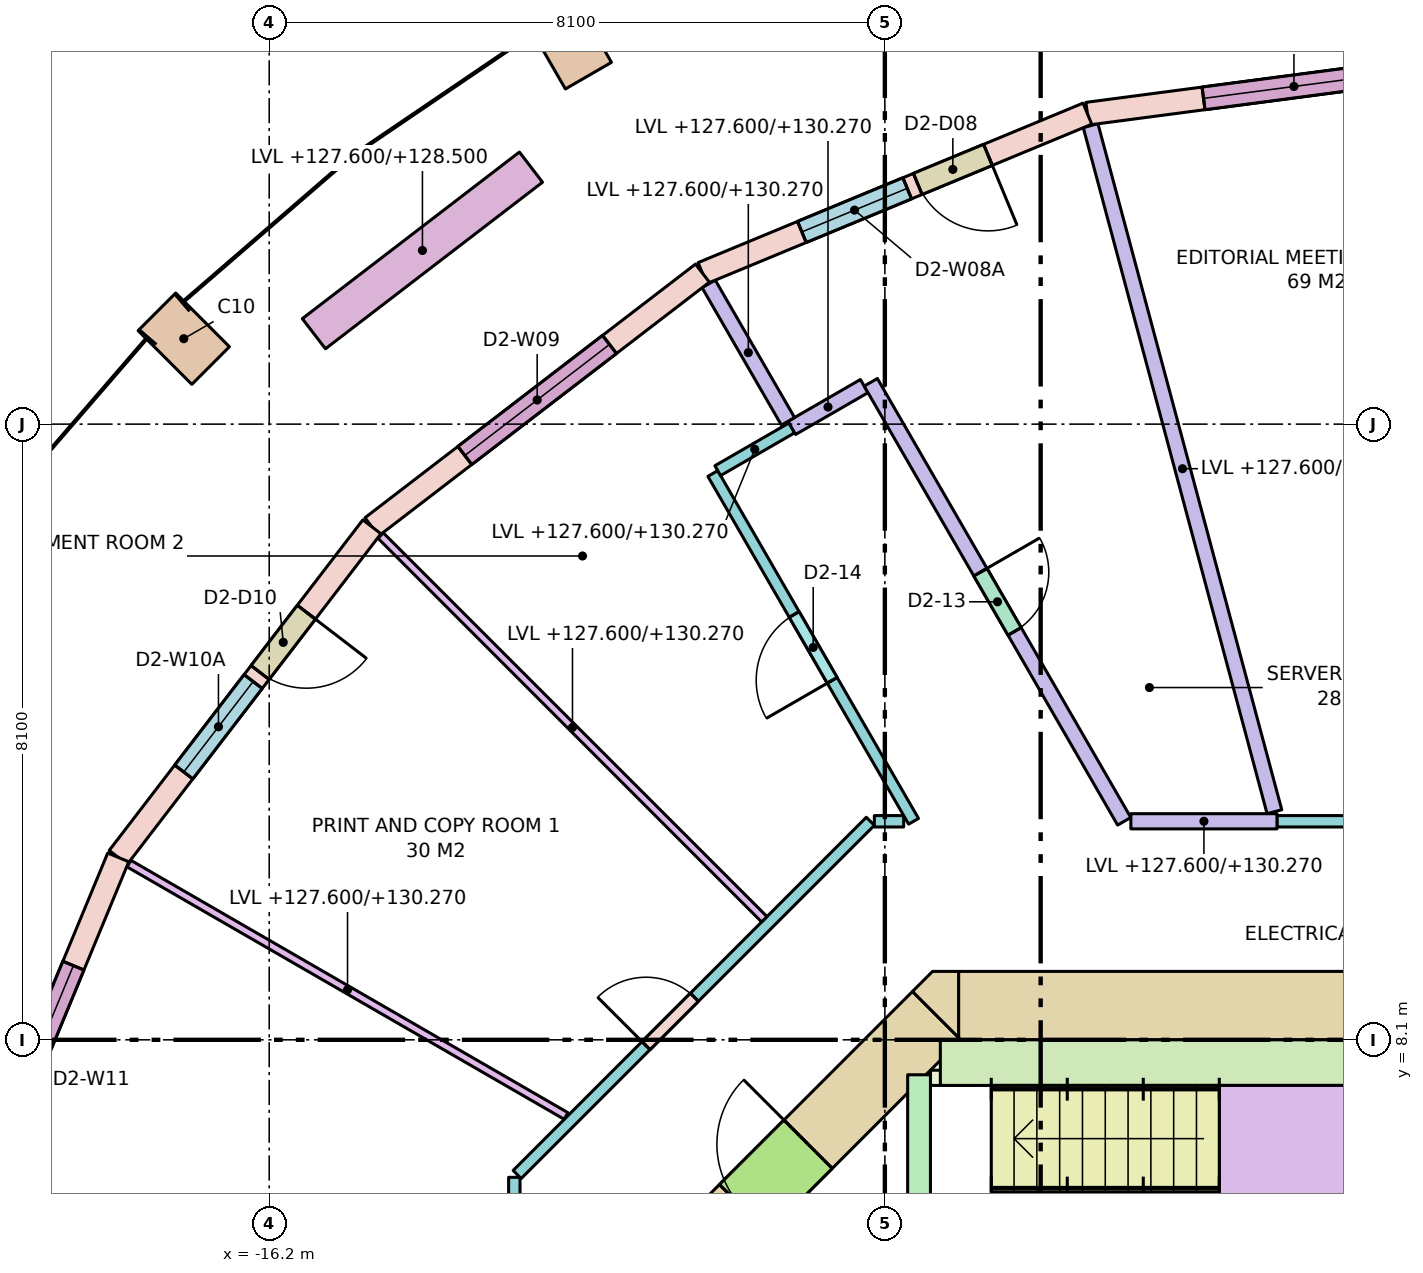
"""IFC4 building model, lengths in metres.
Left out: names, types, materials, properties, quantities, classifications, styles, units other than length and angle.
Written with IfcOpenShell. Run it as: python <this file> out.ifc"""

import sys

from ifc_helpers import new_model, si_unit, direction, frame, frame_2d, origin, origin_2d, place, context, subcontext, project, spatial, polyline, rectangle, outline, extrude, element, fill, save


model = new_model("IFC4")
c1 = context("Model", 3, precision=1e-05, world=origin(), true_north=direction((0.0, 1.0)))
c2 = subcontext(c1, "Body", "Model", "MODEL_VIEW")
j1 = project(units=[si_unit("LENGTHUNIT", "METRE"), si_unit("PLANEANGLEUNIT", "RADIAN")], contexts=[c1])
p1 = place(None, origin())
s1 = spatial("IfcSite", under=j1, at=p1, CompositionType="ELEMENT")
p2 = place(p1, origin())
s2 = spatial("IfcBuilding", under=s1, at=p2, CompositionType="ELEMENT")
p3 = place(p2, frame((0.0, 0.0, 127.6)))
s3 = spatial("IfcBuildingStorey", under=s2, at=p3, CompositionType="ELEMENT", Elevation=127.6)
for number, where, z_axis, x_axis in (
    (1, (-12.25, 21.218, 0.0), (0.0, 0.0, 1.0), (-0.866, -0.5, 0.0)),
    (2, (-17.324, 17.324, 0.0), (0.0, 0.0, 1.0), (-0.707, -0.707, 0.0)),
):
    element("IfcColumn", number, at=place(p3, frame(where, z_axis=z_axis, x_axis=x_axis)), inside=s3, PredefinedType="COLUMN", context=c2, shape_type="SweptSolid", body=[
        extrude(rectangle(XDim=0.7, YDim=1.0, at=origin_2d()), origin(), (0.0, 0.0, 1.0), 3.8),
    ])
p4 = place(p3, frame((-7.13, 8.55, -0.28), z_axis=(0.0, 0.0, 1.0), x_axis=(1.0, 0.0, 0.0)))
e3 = element("IfcWall", 3, at=p4, inside=s3, PredefinedType="SHEAR", context=c2, shape_type="SweptSolid", body=[
    extrude(rectangle(XDim=14.26, YDim=0.9, at=frame_2d((7.13, 0.0))), origin(), (0.0, 0.0, 1.0), 3.8),
])
p5 = place(p4, frame((5.48, 0.0, 0.28)))
e4 = element("IfcOpeningElement", 4, at=p5, cuts=e3, PredefinedType="OPENING", context=c2, shape_type="SweptSolid", body=[
    extrude(rectangle(XDim=0.7, YDim=2.1, at=frame_2d((0.35, 1.05))), frame((0.0, 0.46, 0.0), z_axis=(0.0, -1.0, 0.0), x_axis=(1.0, 0.0, 0.0)), (0.0, 0.0, 1.0), 0.92),
])
p6 = place(p4, frame((7.155, 0.0, 0.28)))
e5 = element("IfcOpeningElement", 5, at=p6, cuts=e3, PredefinedType="OPENING", context=c2, shape_type="SweptSolid", body=[
    extrude(rectangle(XDim=0.9, YDim=2.1, at=frame_2d((0.45, 1.05))), frame((0.0, 0.46, 0.0), z_axis=(0.0, -1.0, 0.0), x_axis=(1.0, 0.0, 0.0)), (0.0, 0.0, 1.0), 0.92),
])
p7 = place(p3, frame((-10.418, 5.418, -0.28), z_axis=(0.0, 0.0, 1.0), x_axis=(0.707106781187, 0.707106781187, 0.0)))
e6 = element("IfcWall", 6, at=p7, inside=s3, PredefinedType="SHEAR", context=c2, shape_type="SweptSolid", body=[
    extrude(rectangle(XDim=4.243, YDim=0.9, at=frame_2d((2.121, 0.0))), origin(), (0.0, 0.0, 1.0), 3.8),
])
p8 = place(p7, frame((0.65, 0.0, 0.28)))
e7 = element("IfcOpeningElement", 7, at=p8, cuts=e6, PredefinedType="OPENING", context=c2, shape_type="SweptSolid", body=[
    extrude(rectangle(XDim=1.2, YDim=2.1, at=frame_2d((0.6, 1.05))), frame((0.0, 0.46, 0.0), z_axis=(0.0, -1.0, 0.0), x_axis=(1.0, 0.0, 0.0)), (0.0, 0.0, 1.0), 0.92),
])
p9 = place(p3, frame((0.0, 0.0, -0.28)))
e8 = element("IfcWall", 8, at=p9, inside=s3, PredefinedType="SHEAR", context=c2, shape_type="SweptSolid", body=[
    extrude(outline(polyline([(-7.473, 9.0), (-7.13, 9.0), (-7.13, 8.13), (-7.736, 8.736), (-7.473, 9.0)])), origin(), (0.0, 0.0, 1.0), 3.8),
])
p10 = place(p3, frame((-7.65, 4.5, 0.0), z_axis=(0.0, 0.0, 1.0), x_axis=(0.0, 1.0, 0.0)))
e9 = element("IfcWall", 9, at=p10, inside=s3, PredefinedType="SHEAR", context=c2, shape_type="SweptSolid", body=[
    extrude(rectangle(XDim=3.14, YDim=0.3, at=frame_2d((1.57, 0.0))), origin(), (0.0, 0.0, 1.0), 3.52),
])
p11 = place(p10, frame((0.14, 0.0, 0.0)))
e10 = element("IfcOpeningElement", 10, at=p11, cuts=e9, PredefinedType="OPENING", context=c2, shape_type="SweptSolid", body=[
    extrude(rectangle(XDim=1.32, YDim=2.1, at=frame_2d((0.66, 1.05))), frame((0.0, 0.16, 0.0), z_axis=(0.0, -1.0, 0.0), x_axis=(1.0, 0.0, 0.0)), (0.0, 0.0, 1.0), 0.32),
])
p12 = place(p3, frame((-7.37, 7.8, 0.0), z_axis=(0.0, 0.0, 1.0), x_axis=(1.0, 0.0, 0.0)))
e11 = element("IfcWall", 11, at=p12, inside=s3, PredefinedType="SHEAR", context=c2, shape_type="SweptSolid", body=[
    extrude(rectangle(XDim=5.37, YDim=0.6, at=frame_2d((2.685, 0.0))), origin(), (0.0, 0.0, 1.0), 3.52),
])
p13 = place(p3, frame((-7.5, 7.6, 0.0), z_axis=(0.0, 0.0, 1.0), x_axis=(1.0, 0.0, 0.0)))
e12 = element("IfcWall", 12, at=p13, inside=s3, PredefinedType="SHEAR", context=c2, shape_type="SweptSolid", body=[
    extrude(rectangle(XDim=0.6, YDim=0.2, at=frame_2d((0.3, 0.0))), origin(), (0.0, 0.0, 1.0), 3.52),
])
p14 = place(p3, frame((0.0, 21.0, 0.0), z_axis=(0.0, 0.0, 1.0), x_axis=(-0.991444743541, -0.130527087244, 0.0)))
e13 = element("IfcWall", 13, at=p14, inside=s3, PredefinedType="STANDARD", context=c2, shape_type="SweptSolid", body=[
    extrude(rectangle(XDim=5.482, YDim=0.3, at=frame_2d((2.741, 0.0))), origin(), (0.0, 0.0, 1.0), 3.52),
])
p15 = place(p14, frame((1.541, 0.0, 0.8)))
e14 = element("IfcOpeningElement", 14, at=p15, cuts=e13, PredefinedType="OPENING", context=c2, shape_type="SweptSolid", body=[
    extrude(rectangle(XDim=2.4, YDim=2.5, at=frame_2d((1.2, 1.25))), frame((0.0, 0.16, 0.0), z_axis=(0.0, -1.0, 0.0), x_axis=(1.0, 0.0, 0.0)), (0.0, 0.0, 1.0), 0.32),
])
p16 = place(p3, frame((-5.435, 20.284, 0.0), z_axis=(0.0, 0.0, 1.0), x_axis=(-0.923877333662, -0.382688740813, 0.0)))
e15 = element("IfcWall", 15, at=p16, inside=s3, PredefinedType="STANDARD", context=c2, shape_type="SweptSolid", body=[
    extrude(rectangle(XDim=5.482, YDim=0.3, at=frame_2d((2.741, 0.0))), origin(), (0.0, 0.0, 1.0), 3.52),
])
p17 = place(p16, frame((1.416, 0.0, 0.0)))
e16 = element("IfcOpeningElement", 16, at=p17, cuts=e15, PredefinedType="OPENING", context=c2, shape_type="SweptSolid", body=[
    extrude(rectangle(XDim=1.0, YDim=2.4, at=frame_2d((0.5, 1.2))), frame((0.0, 0.16, 0.0), z_axis=(0.0, -1.0, 0.0), x_axis=(1.0, 0.0, 0.0)), (0.0, 0.0, 1.0), 0.32),
])
p18 = place(p16, frame((2.566, 0.0, 0.8)))
e17 = element("IfcOpeningElement", 17, at=p18, cuts=e15, PredefinedType="OPENING", context=c2, shape_type="SweptSolid", body=[
    extrude(rectangle(XDim=1.5, YDim=2.5, at=frame_2d((0.75, 1.25))), frame((0.0, 0.16, 0.0), z_axis=(0.0, -1.0, 0.0), x_axis=(1.0, 0.0, 0.0)), (0.0, 0.0, 1.0), 0.32),
])
p19 = place(p3, frame((-10.5, 18.187, 0.0), z_axis=(0.0, 0.0, 1.0), x_axis=(-0.793335336593, -0.608784891166, 0.0)))
e18 = element("IfcWall", 18, at=p19, inside=s3, PredefinedType="STANDARD", context=c2, shape_type="SweptSolid", body=[
    extrude(rectangle(XDim=5.482, YDim=0.3, at=frame_2d((2.741, 0.0))), origin(), (0.0, 0.0, 1.0), 3.52),
])
p20 = place(p19, frame((1.541, 0.0, 0.8)))
e19 = element("IfcOpeningElement", 19, at=p20, cuts=e18, PredefinedType="OPENING", context=c2, shape_type="SweptSolid", body=[
    extrude(rectangle(XDim=2.4, YDim=2.5, at=frame_2d((1.2, 1.25))), frame((0.0, 0.16, 0.0), z_axis=(0.0, -1.0, 0.0), x_axis=(1.0, 0.0, 0.0)), (0.0, 0.0, 1.0), 0.32),
])
p21 = place(p3, frame((-14.849, 14.849, 0.0), z_axis=(0.0, 0.0, 1.0), x_axis=(-0.608784891166, -0.793335336593, 0.0)))
e20 = element("IfcWall", 20, at=p21, inside=s3, PredefinedType="STANDARD", context=c2, shape_type="SweptSolid", body=[
    extrude(rectangle(XDim=5.482, YDim=0.3, at=frame_2d((2.741, 0.0))), origin(), (0.0, 0.0, 1.0), 3.52),
])
p22 = place(p21, frame((1.416, 0.0, 0.0)))
e21 = element("IfcOpeningElement", 21, at=p22, cuts=e20, PredefinedType="OPENING", context=c2, shape_type="SweptSolid", body=[
    extrude(rectangle(XDim=1.0, YDim=2.4, at=frame_2d((0.5, 1.2))), frame((0.0, 0.16, 0.0), z_axis=(0.0, -1.0, 0.0), x_axis=(1.0, 0.0, 0.0)), (0.0, 0.0, 1.0), 0.32),
])
p23 = place(p21, frame((2.566, 0.0, 0.8)))
e22 = element("IfcOpeningElement", 22, at=p23, cuts=e20, PredefinedType="OPENING", context=c2, shape_type="SweptSolid", body=[
    extrude(rectangle(XDim=1.5, YDim=2.5, at=frame_2d((0.75, 1.25))), frame((0.0, 0.16, 0.0), z_axis=(0.0, -1.0, 0.0), x_axis=(1.0, 0.0, 0.0)), (0.0, 0.0, 1.0), 0.32),
])
p24 = place(p3, frame((-18.187, 10.5, 0.0), z_axis=(0.0, 0.0, 1.0), x_axis=(-0.382688740813, -0.923877333662, 0.0)))
e23 = element("IfcWall", 23, at=p24, inside=s3, PredefinedType="STANDARD", context=c2, shape_type="SweptSolid", body=[
    extrude(rectangle(XDim=5.482, YDim=0.3, at=frame_2d((2.741, 0.0))), origin(), (0.0, 0.0, 1.0), 3.52),
])
p25 = place(p24, frame((1.541, 0.0, 0.8)))
e24 = element("IfcOpeningElement", 24, at=p25, cuts=e23, PredefinedType="OPENING", context=c2, shape_type="SweptSolid", body=[
    extrude(rectangle(XDim=2.4, YDim=2.5, at=frame_2d((1.2, 1.25))), frame((0.0, 0.16, 0.0), z_axis=(0.0, -1.0, 0.0), x_axis=(1.0, 0.0, 0.0)), (0.0, 0.0, 1.0), 0.32),
])
p26 = place(p3, frame((-12.756, 19.581, 0.0), z_axis=(0.0, 0.0, 1.0), x_axis=(-0.793384730612, -0.608720518162, 0.0)))
e25 = element("IfcWall", 25, at=p26, inside=s3, PredefinedType="PARAPET", context=c2, shape_type="SweptSolid", body=[
    extrude(rectangle(XDim=3.6, YDim=0.5, at=frame_2d((1.8, 0.0))), origin(), (0.0, 0.0, 1.0), 0.9),
])
p27 = place(p3, frame((-12.975, -6.291, 0.0), z_axis=(0.0, 0.0, 1.0), x_axis=(0.0, 1.0, 0.0)))
e26 = element("IfcWall", 26, at=p27, inside=s3, PredefinedType="PARTITIONING", context=c2, shape_type="SweptSolid", body=[
    extrude(rectangle(XDim=12.582, YDim=0.15, at=frame_2d((6.291, 0.0))), origin(), (0.0, 0.0, 1.0), 2.67),
])
p28 = place(p27, frame((5.391, 0.0, 0.0)))
e27 = element("IfcOpeningElement", 27, at=p28, cuts=e26, PredefinedType="OPENING", context=c2, shape_type="SweptSolid", body=[
    extrude(rectangle(XDim=1.8, YDim=2.1, at=frame_2d((0.9, 1.05))), frame((0.0, 0.085, 0.0), z_axis=(0.0, -1.0, 0.0), x_axis=(1.0, 0.0, 0.0)), (0.0, 0.0, 1.0), 0.17),
])
p29 = place(p3, frame((-12.938, 6.328, 0.0), z_axis=(0.0, 0.0, 1.0), x_axis=(0.707088206597, 0.707125355289, 0.0)))
e28 = element("IfcWall", 28, at=p29, inside=s3, PredefinedType="PARTITIONING", context=c2, shape_type="SweptSolid", body=[
    extrude(rectangle(XDim=6.572, YDim=0.15, at=frame_2d((3.286, 0.0))), origin(), (0.0, 0.0, 1.0), 2.67),
])
p30 = place(p29, frame((2.398, 0.0, 0.0)))
e29 = element("IfcOpeningElement", 29, at=p30, cuts=e28, PredefinedType="OPENING", context=c2, shape_type="SweptSolid", body=[
    extrude(rectangle(XDim=0.9, YDim=2.1, at=frame_2d((0.45, 1.05))), frame((0.0, 0.085, 0.0), z_axis=(0.0, -1.0, 0.0), x_axis=(1.0, 0.0, 0.0)), (0.0, 0.0, 1.0), 0.17),
])
p31 = place(p3, frame((-8.238, 10.975, 0.0), z_axis=(0.0, 0.0, 1.0), x_axis=(1.0, 0.0, 0.0)))
e30 = element("IfcWall", 30, at=p31, inside=s3, PredefinedType="PARTITIONING", context=c2, shape_type="SweptSolid", body=[
    extrude(rectangle(XDim=0.386, YDim=0.15, at=frame_2d((0.193, 0.0))), origin(), (0.0, 0.0, 1.0), 3.52),
])
p32 = place(p3, frame((-7.722, 10.975, 0.0), z_axis=(0.0, 0.0, 1.0), x_axis=(-0.499981143329, 0.866036290415, 0.0)))
e31 = element("IfcWall", 31, at=p32, inside=s3, PredefinedType="PARTITIONING", context=c2, shape_type="SweptSolid", body=[
    extrude(rectangle(XDim=5.283, YDim=0.15, at=frame_2d((2.642, 0.0))), origin(), (0.0, 0.0, 1.0), 3.52),
])
p33 = place(p32, frame((2.142, 0.0, 0.0)))
e32 = element("IfcOpeningElement", 32, at=p33, cuts=e31, PredefinedType="OPENING", context=c2, shape_type="SweptSolid", body=[
    extrude(rectangle(XDim=1.0, YDim=2.1, at=frame_2d((0.5, 1.05))), frame((0.0, 0.085, 0.0), z_axis=(0.0, -1.0, 0.0), x_axis=(1.0, 0.0, 0.0)), (0.0, 0.0, 1.0), 0.17),
])
p34 = place(p3, frame((-10.299, 15.588, 0.0), z_axis=(0.0, 0.0, 1.0), x_axis=(0.86599040064, 0.500060622324, 0.0)))
e33 = element("IfcWall", 33, at=p34, inside=s3, PredefinedType="PARTITIONING", context=c2, shape_type="SweptSolid", body=[
    extrude(rectangle(XDim=1.125, YDim=0.15, at=frame_2d((0.562, 0.0))), origin(), (0.0, 0.0, 1.0), 2.67),
])
p35 = place(p3, frame((-9.324, 16.15, 0.0), z_axis=(0.0, 0.0, 1.0), x_axis=(0.866159722779, 0.499767280476, 0.0)))
e34 = element("IfcWall", 34, at=p35, inside=s3, PredefinedType="PARTITIONING", context=c2, shape_type="SweptSolid", body=[
    extrude(rectangle(XDim=1.1, YDim=0.2, at=frame_2d((0.55, 0.0))), origin(), (0.0, 0.0, 1.0), 2.67),
])
p36 = place(p3, frame((-8.285, 16.75, 0.0), z_axis=(0.0, 0.0, 1.0), x_axis=(0.500021399824, -0.866013048238, 0.0)))
e35 = element("IfcWall", 35, at=p36, inside=s3, PredefinedType="PARTITIONING", context=c2, shape_type="SweptSolid", body=[
    extrude(rectangle(XDim=6.669, YDim=0.2, at=frame_2d((3.334, 0.0))), origin(), (0.0, 0.0, 1.0), 3.52),
])
p37 = place(p36, frame((2.884, 0.0, 0.0)))
e36 = element("IfcOpeningElement", 36, at=p37, cuts=e35, PredefinedType="OPENING", context=c2, shape_type="SweptSolid", body=[
    extrude(rectangle(XDim=0.9, YDim=2.1, at=frame_2d((0.45, 1.05))), frame((0.0, 0.11, 0.0), z_axis=(0.0, -1.0, 0.0), x_axis=(1.0, 0.0, 0.0)), (0.0, 0.0, 1.0), 0.22),
])
p38 = place(p3, frame((-4.863, 10.975, 0.0), z_axis=(0.0, 0.0, 1.0), x_axis=(1.0, 0.0, 0.0)))
e37 = element("IfcWall", 37, at=p38, inside=s3, PredefinedType="PARTITIONING", context=c2, shape_type="SweptSolid", body=[
    extrude(rectangle(XDim=1.923, YDim=0.2, at=frame_2d((0.961, 0.0))), origin(), (0.0, 0.0, 1.0), 2.67),
])
p39 = place(p3, frame((-2.941, 10.975, 0.0), z_axis=(0.0, 0.0, 1.0), x_axis=(1.0, 0.0, 0.0)))
e38 = element("IfcWall", 38, at=p39, inside=s3, PredefinedType="PARTITIONING", context=c2, shape_type="SweptSolid", body=[
    extrude(rectangle(XDim=4.567, YDim=0.15, at=frame_2d((2.283, 0.0))), origin(), (0.0, 0.0, 1.0), 2.67),
])
p40 = place(p3, frame((-2.974, 11.101, 0.0), z_axis=(0.0, 0.0, 1.0), x_axis=(-0.258810523233, 0.965928109677, 0.0)))
e39 = element("IfcWall", 39, at=p40, inside=s3, PredefinedType="PARTITIONING", context=c2, shape_type="SweptSolid", body=[
    extrude(rectangle(XDim=9.344, YDim=0.2, at=frame_2d((4.672, 0.0))), origin(), (0.0, 0.0, 1.0), 2.67),
])
p41 = place(p3, frame((-9.375, 16.237, 0.0), z_axis=(0.0, 0.0, 1.0), x_axis=(-0.499961989906, 0.86604734781, 0.0)))
e40 = element("IfcWall", 40, at=p41, inside=s3, PredefinedType="PARTITIONING", context=c2, shape_type="SweptSolid", body=[
    extrude(rectangle(XDim=2.088, YDim=0.2, at=frame_2d((1.044, 0.0))), origin(), (0.0, 0.0, 1.0), 2.67),
])
p42 = place(p3, frame((-9.686, 9.686, 0.0), z_axis=(0.0, 0.0, 1.0), x_axis=(-0.707106781187, 0.707106781187, 0.0)))
e41 = element("IfcWall", 41, at=p42, inside=s3, PredefinedType="PARTITIONING", context=c2, shape_type="SweptSolid", body=[
    extrude(rectangle(XDim=7.139, YDim=0.1, at=frame_2d((3.569, 0.0))), origin(), (0.0, 0.0, 1.0), 2.67),
])
p43 = place(p3, frame((-12.294, 7.098, 0.0), z_axis=(0.0, 0.0, 1.0), x_axis=(-0.866010486135, 0.500025837236, 0.0)))
e42 = element("IfcWall", 42, at=p43, inside=s3, PredefinedType="PARTITIONING", context=c2, shape_type="SweptSolid", body=[
    extrude(rectangle(XDim=6.641, YDim=0.1, at=frame_2d((3.32, 0.0))), origin(), (0.0, 0.0, 1.0), 2.67),
])
p44 = place(p15, origin())
e43 = element("IfcWindow", 43, at=p44, inside=s3, PartitioningType="SINGLE_PANEL", PredefinedType="WINDOW", context=c2, shape_type="SweptSolid", body=[
    extrude(rectangle(XDim=2.4, YDim=2.5, at=frame_2d((1.2, 1.25))), frame((0.0, 0.03, 0.0), z_axis=(0.0, -1.0, 0.0), x_axis=(1.0, 0.0, 0.0)), (0.0, 0.0, 1.0), 0.06),
])
fill(e14, e43)
p45 = place(p17, origin())
e44 = element("IfcDoor", 44, at=p45, inside=s3, OperationType="SINGLE_SWING_LEFT", PredefinedType="DOOR", context=c2, shape_type="SweptSolid", body=[
    extrude(rectangle(XDim=1.0, YDim=2.4, at=frame_2d((0.5, 1.2))), frame((0.0, 0.025, 0.0), z_axis=(0.0, -1.0, 0.0), x_axis=(1.0, 0.0, 0.0)), (0.0, 0.0, 1.0), 0.05),
])
fill(e16, e44)
p46 = place(p18, origin())
e45 = element("IfcWindow", 45, at=p46, inside=s3, PartitioningType="SINGLE_PANEL", PredefinedType="WINDOW", context=c2, shape_type="SweptSolid", body=[
    extrude(rectangle(XDim=1.5, YDim=2.5, at=frame_2d((0.75, 1.25))), frame((0.0, 0.03, 0.0), z_axis=(0.0, -1.0, 0.0), x_axis=(1.0, 0.0, 0.0)), (0.0, 0.0, 1.0), 0.06),
])
fill(e17, e45)
p47 = place(p20, origin())
e46 = element("IfcWindow", 46, at=p47, inside=s3, PartitioningType="SINGLE_PANEL", PredefinedType="WINDOW", context=c2, shape_type="SweptSolid", body=[
    extrude(rectangle(XDim=2.4, YDim=2.5, at=frame_2d((1.2, 1.25))), frame((0.0, 0.03, 0.0), z_axis=(0.0, -1.0, 0.0), x_axis=(1.0, 0.0, 0.0)), (0.0, 0.0, 1.0), 0.06),
])
fill(e19, e46)
p48 = place(p22, origin())
e47 = element("IfcDoor", 47, at=p48, inside=s3, OperationType="SINGLE_SWING_LEFT", PredefinedType="DOOR", context=c2, shape_type="SweptSolid", body=[
    extrude(rectangle(XDim=1.0, YDim=2.4, at=frame_2d((0.5, 1.2))), frame((0.0, 0.025, 0.0), z_axis=(0.0, -1.0, 0.0), x_axis=(1.0, 0.0, 0.0)), (0.0, 0.0, 1.0), 0.05),
])
fill(e21, e47)
p49 = place(p23, origin())
e48 = element("IfcWindow", 48, at=p49, inside=s3, PartitioningType="SINGLE_PANEL", PredefinedType="WINDOW", context=c2, shape_type="SweptSolid", body=[
    extrude(rectangle(XDim=1.5, YDim=2.5, at=frame_2d((0.75, 1.25))), frame((0.0, 0.03, 0.0), z_axis=(0.0, -1.0, 0.0), x_axis=(1.0, 0.0, 0.0)), (0.0, 0.0, 1.0), 0.06),
])
fill(e22, e48)
p50 = place(p25, origin())
e49 = element("IfcWindow", 49, at=p50, inside=s3, PartitioningType="SINGLE_PANEL", PredefinedType="WINDOW", context=c2, shape_type="SweptSolid", body=[
    extrude(rectangle(XDim=2.4, YDim=2.5, at=frame_2d((1.2, 1.25))), frame((0.0, 0.03, 0.0), z_axis=(0.0, -1.0, 0.0), x_axis=(1.0, 0.0, 0.0)), (0.0, 0.0, 1.0), 0.06),
])
fill(e24, e49)
p51 = place(p8, origin())
e50 = element("IfcDoor", 50, at=p51, inside=s3, OperationType="SINGLE_SWING_RIGHT", PredefinedType="DOOR", context=c2, shape_type="SweptSolid", body=[
    extrude(rectangle(XDim=1.2, YDim=2.1, at=frame_2d((0.6, 1.05))), frame((0.0, 0.025, 0.0), z_axis=(0.0, -1.0, 0.0), x_axis=(1.0, 0.0, 0.0)), (0.0, 0.0, 1.0), 0.05),
])
fill(e7, e50)
p52 = place(p37, origin())
e51 = element("IfcDoor", 51, at=p52, inside=s3, OperationType="SINGLE_SWING_LEFT", PredefinedType="DOOR", context=c2, shape_type="SweptSolid", body=[
    extrude(rectangle(XDim=0.9, YDim=2.1, at=frame_2d((0.45, 1.05))), frame((0.0, 0.025, 0.0), z_axis=(0.0, -1.0, 0.0), x_axis=(1.0, 0.0, 0.0)), (0.0, 0.0, 1.0), 0.05),
])
fill(e36, e51)
p53 = place(p33, origin())
e52 = element("IfcDoor", 52, at=p53, inside=s3, OperationType="SINGLE_SWING_LEFT", PredefinedType="DOOR", context=c2, shape_type="SweptSolid", body=[
    extrude(rectangle(XDim=1.0, YDim=2.1, at=frame_2d((0.5, 1.05))), frame((0.0, 0.025, 0.0), z_axis=(0.0, -1.0, 0.0), x_axis=(1.0, 0.0, 0.0)), (0.0, 0.0, 1.0), 0.05),
])
fill(e32, e52)
p54 = place(p30, origin())
e53 = element("IfcDoor", 53, at=p54, inside=s3, OperationType="SINGLE_SWING_LEFT", PredefinedType="DOOR", context=c2, shape_type="SweptSolid", body=[
    extrude(rectangle(XDim=0.9, YDim=2.1, at=frame_2d((0.45, 1.05))), frame((0.0, 0.025, 0.0), z_axis=(0.0, -1.0, 0.0), x_axis=(1.0, 0.0, 0.0)), (0.0, 0.0, 1.0), 0.05),
])
fill(e29, e53)
save(model, sys.argv[1])
